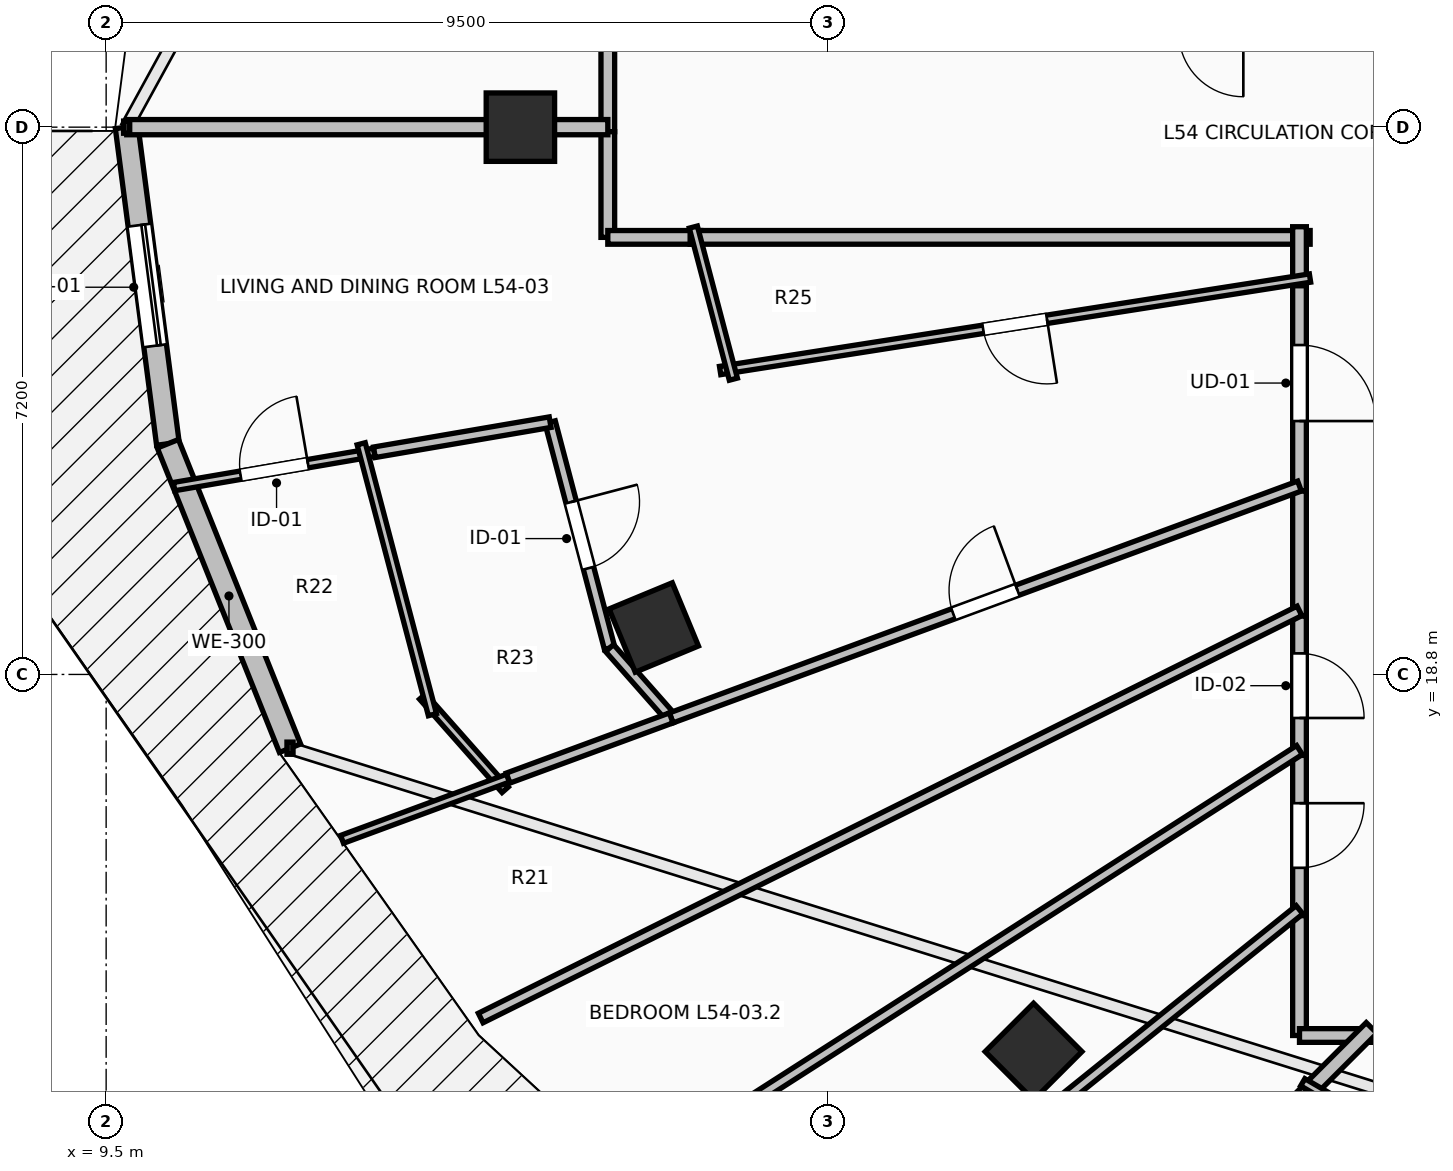
"""IFC4 building model, lengths in metres.
Left out: names, types, materials, properties, quantities, classifications, styles, units other than length and angle.
Written with IfcOpenShell. Run it as: python <this file> out.ifc"""

import sys

from ifc_helpers import new_model, si_unit, direction, frame, frame_2d, origin, origin_2d, place, context, subcontext, project, spatial, rectangle, extrude, element, fill, save


model = new_model("IFC4")
c1 = context("Model", 3, precision=1e-05, world=origin(), true_north=direction((0.0, 1.0)))
c2 = subcontext(c1, "Body", "Model", "MODEL_VIEW")
j1 = project(units=[si_unit("LENGTHUNIT", "METRE"), si_unit("PLANEANGLEUNIT", "RADIAN")], contexts=[c1])
p1 = place(None, origin())
s1 = spatial("IfcSite", under=j1, at=p1, CompositionType="ELEMENT")
p2 = place(p1, origin())
s2 = spatial("IfcBuilding", under=s1, at=p2, CompositionType="ELEMENT")
p3 = place(p2, frame((0.0, 0.0, 200.1)))
s3 = spatial("IfcBuildingStorey", under=s2, at=p3, CompositionType="ELEMENT", Elevation=200.1)
for number, where, z_axis, x_axis in (
    (1, (14.95, 26.0, 0.0), (0.0, 0.0, 1.0), (-1.0, 0.0, 0.0)),
    (2, (16.705, 19.418, 0.0), (0.0, 0.0, 1.0), (-0.924, -0.383, 0.0)),
    (3, (21.701, 13.838, 0.0), (0.0, 0.0, 1.0), (-0.707, -0.707, 0.0)),
):
    element("IfcColumn", number, at=place(p3, frame(where, z_axis=z_axis, x_axis=x_axis)), inside=s3, PredefinedType="COLUMN", context=c2, shape_type="SweptSolid", body=[
        extrude(rectangle(XDim=0.9, YDim=0.9, at=origin_2d()), origin(), (0.0, 0.0, 1.0), 3.55),
    ])
p4 = place(p3, frame((9.77, 26.0, 0.0), z_axis=(0.0, 0.0, 1.0), x_axis=(0.129147853268, -0.991625348605, 0.0)))
e4 = element("IfcWall", 4, at=p4, inside=s3, PredefinedType="STANDARD", context=c2, shape_type="SweptSolid", body=[
    extrude(rectangle(XDim=4.2, YDim=0.3, at=frame_2d((2.1, 0.0))), origin(), (0.0, 0.0, 1.0), 3.29),
])
p5 = place(p4, frame((1.3, 0.0, 0.0)))
e5 = element("IfcOpeningElement", 5, at=p5, cuts=e4, PredefinedType="OPENING", context=c2, shape_type="SweptSolid", body=[
    extrude(rectangle(XDim=1.6, YDim=2.3, at=frame_2d((0.8, 1.15))), frame((0.0, 0.165, 0.0), z_axis=(0.0, -1.0, 0.0), x_axis=(1.0, 0.0, 0.0)), (0.0, 0.0, 1.0), 0.33),
])
p6 = place(p3, frame((10.312, 21.835, 0.0), z_axis=(0.0, 0.0, 1.0), x_axis=(0.372268409848, -0.928125116043, 0.0)))
e6 = element("IfcWall", 6, at=p6, inside=s3, PredefinedType="STANDARD", context=c2, shape_type="SweptSolid", body=[
    extrude(rectangle(XDim=4.315, YDim=0.3, at=frame_2d((2.158, 0.0))), origin(), (0.0, 0.0, 1.0), 3.29),
])
p7 = place(p3, frame((16.1, 27.25, 0.0), z_axis=(0.0, 0.0, 1.0), x_axis=(0.0, -1.0, 0.0)))
e7 = element("IfcWall", 7, at=p7, inside=s3, PredefinedType="PARTITIONING", context=c2, shape_type="SweptSolid", body=[
    extrude(rectangle(XDim=1.31, YDim=0.18, at=frame_2d((0.655, 0.0))), origin(), (0.0, 0.0, 1.0), 2.482),
])
p8 = place(p3, frame((16.1, 25.94, 0.0), z_axis=(0.0, 0.0, 1.0), x_axis=(0.0, -1.0, 0.0)))
e8 = element("IfcWall", 8, at=p8, inside=s3, PredefinedType="PARTITIONING", context=c2, shape_type="SweptSolid", body=[
    extrude(rectangle(XDim=1.39, YDim=0.18, at=frame_2d((0.695, 0.0))), origin(), (0.0, 0.0, 1.0), 2.482),
])
p9 = place(p3, frame((16.1, 24.55, 0.0), z_axis=(0.0, 0.0, 1.0), x_axis=(1.0, 0.0, 0.0)))
e9 = element("IfcWall", 9, at=p9, inside=s3, PredefinedType="PARTITIONING", context=c2, shape_type="SweptSolid", body=[
    extrude(rectangle(XDim=1.223, YDim=0.18, at=frame_2d((0.611, 0.0))), origin(), (0.0, 0.0, 1.0), 3.29),
])
p10 = place(p3, frame((25.2, 24.053, 0.0), z_axis=(0.0, 0.0, 1.0), x_axis=(0.0, -1.0, 0.0)))
e10 = element("IfcWall", 10, at=p10, inside=s3, PredefinedType="PARTITIONING", context=c2, shape_type="SweptSolid", body=[
    extrude(rectangle(XDim=2.839, YDim=0.18, at=frame_2d((1.419, 0.0))), origin(), (0.0, 0.0, 1.0), 3.29),
])
p11 = place(p10, frame((0.919, 0.0, 0.0)))
e11 = element("IfcOpeningElement", 11, at=p11, cuts=e10, PredefinedType="OPENING", context=c2, shape_type="SweptSolid", body=[
    extrude(rectangle(XDim=1.0, YDim=2.15, at=frame_2d((0.5, 1.075))), frame((0.0, 0.105, 0.0), z_axis=(0.0, -1.0, 0.0), x_axis=(1.0, 0.0, 0.0)), (0.0, 0.0, 1.0), 0.21),
])
p12 = place(p3, frame((17.183, 24.55, 0.0), z_axis=(0.0, 0.0, 1.0), x_axis=(1.0, 0.0, 0.0)))
e12 = element("IfcWall", 12, at=p12, inside=s3, PredefinedType="PARTITIONING", context=c2, shape_type="SweptSolid", body=[
    extrude(rectangle(XDim=8.157, YDim=0.18, at=frame_2d((4.079, 0.0))), origin(), (0.0, 0.0, 1.0), 2.936),
])
p13 = place(p3, frame((25.2, 24.69, 0.0), z_axis=(0.0, 0.0, 1.0), x_axis=(0.0, -1.0, 0.0)))
e13 = element("IfcWall", 13, at=p13, inside=s3, PredefinedType="PARTITIONING", context=c2, shape_type="SweptSolid", body=[
    extrude(rectangle(XDim=0.777, YDim=0.18, at=frame_2d((0.388, 0.0))), origin(), (0.0, 0.0, 1.0), 3.29),
])
p14 = place(p3, frame((25.2, 21.214, 0.0), z_axis=(0.0, 0.0, 1.0), x_axis=(0.0, -1.0, 0.0)))
e14 = element("IfcWall", 14, at=p14, inside=s3, PredefinedType="PARTITIONING", context=c2, shape_type="SweptSolid", body=[
    extrude(rectangle(XDim=1.645, YDim=0.18, at=frame_2d((0.823, 0.0))), origin(), (0.0, 0.0, 1.0), 3.29),
])
p15 = place(p3, frame((25.2, 19.569, 0.0), z_axis=(0.0, 0.0, 1.0), x_axis=(0.0, -1.0, 0.0)))
e15 = element("IfcWall", 15, at=p15, inside=s3, PredefinedType="PARTITIONING", context=c2, shape_type="SweptSolid", body=[
    extrude(rectangle(XDim=1.834, YDim=0.18, at=frame_2d((0.917, 0.0))), origin(), (0.0, 0.0, 1.0), 3.29),
])
p16 = place(p15, frame((0.492, 0.0, 0.0)))
e16 = element("IfcOpeningElement", 16, at=p16, cuts=e15, PredefinedType="OPENING", context=c2, shape_type="SweptSolid", body=[
    extrude(rectangle(XDim=0.85, YDim=2.1, at=frame_2d((0.425, 1.05))), frame((0.0, 0.105, 0.0), z_axis=(0.0, -1.0, 0.0), x_axis=(1.0, 0.0, 0.0)), (0.0, 0.0, 1.0), 0.21),
])
p17 = place(p3, frame((25.2, 17.735, 0.0), z_axis=(0.0, 0.0, 1.0), x_axis=(0.0, -1.0, 0.0)))
e17 = element("IfcWall", 17, at=p17, inside=s3, PredefinedType="PARTITIONING", context=c2, shape_type="SweptSolid", body=[
    extrude(rectangle(XDim=2.108, YDim=0.18, at=frame_2d((1.054, 0.0))), origin(), (0.0, 0.0, 1.0), 2.482),
])
p18 = place(p17, frame((0.629, 0.0, 0.0)))
e18 = element("IfcOpeningElement", 18, at=p18, cuts=e17, PredefinedType="OPENING", context=c2, shape_type="SweptSolid", body=[
    extrude(rectangle(XDim=0.85, YDim=2.1, at=frame_2d((0.425, 1.05))), frame((0.0, 0.105, 0.0), z_axis=(0.0, -1.0, 0.0), x_axis=(1.0, 0.0, 0.0)), (0.0, 0.0, 1.0), 0.21),
])
p19 = place(p3, frame((25.2, 15.627, 0.0), z_axis=(0.0, 0.0, 1.0), x_axis=(0.0, -1.0, 0.0)))
e19 = element("IfcWall", 19, at=p19, inside=s3, PredefinedType="PARTITIONING", context=c2, shape_type="SweptSolid", body=[
    extrude(rectangle(XDim=1.577, YDim=0.18, at=frame_2d((0.789, 0.0))), origin(), (0.0, 0.0, 1.0), 2.482),
])
p20 = place(p3, frame((25.2, 14.05, 0.0), z_axis=(0.0, 0.0, 1.0), x_axis=(1.0, 0.0, 0.0)))
e20 = element("IfcWall", 20, at=p20, inside=s3, PredefinedType="PARTITIONING", context=c2, shape_type="SweptSolid", body=[
    extrude(rectangle(XDim=0.91, YDim=0.18, at=frame_2d((0.455, 0.0))), origin(), (0.0, 0.0, 1.0), 3.022),
])
p21 = place(p3, frame((25.97, 14.05, 0.0), z_axis=(0.0, 0.0, 1.0), x_axis=(1.0, 0.0, 0.0)))
e21 = element("IfcWall", 21, at=p21, inside=s3, PredefinedType="PARTITIONING", context=c2, shape_type="SweptSolid", body=[
    extrude(rectangle(XDim=3.385, YDim=0.18, at=frame_2d((1.692, 0.0))), origin(), (0.0, 0.0, 1.0), 2.482),
])
p22 = place(p3, frame((9.771, 26.0, 0.0), z_axis=(0.0, 0.0, 1.0), x_axis=(1.0, 0.0, 0.0)))
e22 = element("IfcWall", 22, at=p22, inside=s3, PredefinedType="PARTITIONING", context=c2, shape_type="SweptSolid", body=[
    extrude(rectangle(XDim=6.329, YDim=0.2, at=frame_2d((3.165, 0.0))), origin(), (0.0, 0.0, 1.0), 2.482),
])
p23 = place(p3, frame((25.338, 24.015, 0.0), z_axis=(0.0, 0.0, 1.0), x_axis=(-0.987940229144, -0.154835731144, 0.0)))
e23 = element("IfcWall", 23, at=p23, inside=s3, PredefinedType="PARTITIONING", context=c2, shape_type="SweptSolid", body=[
    extrude(rectangle(XDim=7.855, YDim=0.11, at=frame_2d((3.928, 0.0))), origin(), (0.0, 0.0, 1.0), 2.936),
])
p24 = place(p23, frame((3.503, 0.0, 0.0)))
e24 = element("IfcOpeningElement", 24, at=p24, cuts=e23, PredefinedType="OPENING", context=c2, shape_type="SweptSolid", body=[
    extrude(rectangle(XDim=0.85, YDim=2.1, at=frame_2d((0.425, 1.05))), frame((0.0, 0.07, 0.0), z_axis=(0.0, -1.0, 0.0), x_axis=(1.0, 0.0, 0.0)), (0.0, 0.0, 1.0), 0.14),
])
p25 = place(p3, frame((17.752, 22.685, 0.0), z_axis=(0.0, 0.0, 1.0), x_axis=(-0.254429402158, 0.967091350038, 0.0)))
e25 = element("IfcWall", 25, at=p25, inside=s3, PredefinedType="PARTITIONING", context=c2, shape_type="SweptSolid", body=[
    extrude(rectangle(XDim=2.069, YDim=0.11, at=frame_2d((1.034, 0.0))), origin(), (0.0, 0.0, 1.0), 3.29),
])
p26 = place(p3, frame((10.394, 21.271, 0.0), z_axis=(0.0, 0.0, 1.0), x_axis=(0.985656128296, 0.168766100722, 0.0)))
e26 = element("IfcWall", 26, at=p26, inside=s3, PredefinedType="PARTITIONING", context=c2, shape_type="SweptSolid", body=[
    extrude(rectangle(XDim=2.673, YDim=0.11, at=frame_2d((1.337, 0.0))), origin(), (0.0, 0.0, 1.0), 3.29),
])
p27 = place(p26, frame((0.887, 0.0, 0.0)))
e27 = element("IfcOpeningElement", 27, at=p27, cuts=e26, PredefinedType="OPENING", context=c2, shape_type="SweptSolid", body=[
    extrude(rectangle(XDim=0.9, YDim=2.1, at=frame_2d((0.45, 1.05))), frame((0.0, 0.07, 0.0), z_axis=(0.0, -1.0, 0.0), x_axis=(1.0, 0.0, 0.0)), (0.0, 0.0, 1.0), 0.14),
])
p28 = place(p3, frame((15.341, 22.119, 0.0), z_axis=(0.0, 0.0, 1.0), x_axis=(0.254462015144, -0.967082769389, 0.0)))
e28 = element("IfcWall", 28, at=p28, inside=s3, PredefinedType="PARTITIONING", context=c2, shape_type="SweptSolid", body=[
    extrude(rectangle(XDim=3.073, YDim=0.14, at=frame_2d((1.537, 0.0))), origin(), (0.0, 0.0, 1.0), 3.29),
])
p29 = place(p28, frame((1.087, 0.0, 0.0)))
e29 = element("IfcOpeningElement", 29, at=p29, cuts=e28, PredefinedType="OPENING", context=c2, shape_type="SweptSolid", body=[
    extrude(rectangle(XDim=0.9, YDim=2.1, at=frame_2d((0.45, 1.05))), frame((0.0, 0.085, 0.0), z_axis=(0.0, -1.0, 0.0), x_axis=(1.0, 0.0, 0.0)), (0.0, 0.0, 1.0), 0.17),
])
p30 = place(p3, frame((16.123, 19.147, 0.0), z_axis=(0.0, 0.0, 1.0), x_axis=(0.66171386468, -0.749756467988, 0.0)))
e30 = element("IfcWall", 30, at=p30, inside=s3, PredefinedType="PARTITIONING", context=c2, shape_type="SweptSolid", body=[
    extrude(rectangle(XDim=1.226, YDim=0.14, at=frame_2d((0.613, 0.0))), origin(), (0.0, 0.0, 1.0), 3.29),
])
p31 = place(p3, frame((13.029, 21.723, 0.0), z_axis=(0.0, 0.0, 1.0), x_axis=(0.985629682191, 0.16892048302, 0.0)))
e31 = element("IfcWall", 31, at=p31, inside=s3, PredefinedType="PARTITIONING", context=c2, shape_type="SweptSolid", body=[
    extrude(rectangle(XDim=2.346, YDim=0.14, at=frame_2d((1.173, 0.0))), origin(), (0.0, 0.0, 1.0), 3.29),
])
p32 = place(p3, frame((16.934, 18.228, 0.0), z_axis=(0.0, 0.0, 1.0), x_axis=(0.938168899516, 0.34617786755, 0.0)))
e32 = element("IfcWall", 32, at=p32, inside=s3, PredefinedType="PARTITIONING", context=c2, shape_type="SweptSolid", body=[
    extrude(rectangle(XDim=8.811, YDim=0.14, at=frame_2d((4.405, 0.0))), origin(), (0.0, 0.0, 1.0), 2.482),
])
p33 = place(p32, frame((3.955, 0.0, 0.0)))
e33 = element("IfcOpeningElement", 33, at=p33, cuts=e32, PredefinedType="OPENING", context=c2, shape_type="SweptSolid", body=[
    extrude(rectangle(XDim=0.9, YDim=2.1, at=frame_2d((0.45, 1.05))), frame((0.0, 0.085, 0.0), z_axis=(0.0, -1.0, 0.0), x_axis=(1.0, 0.0, 0.0)), (0.0, 0.0, 1.0), 0.17),
])
p34 = place(p3, frame((14.75, 17.283, 0.0), z_axis=(0.0, 0.0, 1.0), x_axis=(-0.662345628205, 0.749198417509, 0.0)))
e34 = element("IfcWall", 34, at=p34, inside=s3, PredefinedType="PARTITIONING", context=c2, shape_type="SweptSolid", body=[
    extrude(rectangle(XDim=1.639, YDim=0.11, at=frame_2d((0.819, 0.0))), origin(), (0.0, 0.0, 1.0), 3.29),
])
p35 = place(p3, frame((13.792, 18.271, 0.0), z_axis=(0.0, 0.0, 1.0), x_axis=(-0.254271540361, 0.967132867688, 0.0)))
e35 = element("IfcWall", 35, at=p35, inside=s3, PredefinedType="PARTITIONING", context=c2, shape_type="SweptSolid", body=[
    extrude(rectangle(XDim=3.685, YDim=0.11, at=frame_2d((1.843, 0.0))), origin(), (0.0, 0.0, 1.0), 3.29),
])
p36 = place(p3, frame((12.604, 16.631, 0.0), z_axis=(0.0, 0.0, 1.0), x_axis=(0.938194450562, 0.346108614361, 0.0)))
e36 = element("IfcWall", 36, at=p36, inside=s3, PredefinedType="PARTITIONING", context=c2, shape_type="SweptSolid", body=[
    extrude(rectangle(XDim=2.328, YDim=0.11, at=frame_2d((1.164, 0.0))), origin(), (0.0, 0.0, 1.0), 3.29),
])
p37 = place(p3, frame((14.788, 17.436, 0.0), z_axis=(0.0, 0.0, 1.0), x_axis=(0.938171690747, 0.346170303003, 0.0)))
e37 = element("IfcWall", 37, at=p37, inside=s3, PredefinedType="PARTITIONING", context=c2, shape_type="SweptSolid", body=[
    extrude(rectangle(XDim=2.287, YDim=0.14, at=frame_2d((1.144, 0.0))), origin(), (0.0, 0.0, 1.0), 3.29),
])
p38 = place(p3, frame((14.428, 14.28, 0.0), z_axis=(0.0, 0.0, 1.0), x_axis=(0.895423439435, 0.44521552546, 0.0)))
e38 = element("IfcWall", 38, at=p38, inside=s3, PredefinedType="PARTITIONING", context=c2, shape_type="SweptSolid", body=[
    extrude(rectangle(XDim=12.03, YDim=0.14, at=frame_2d((6.015, 0.0))), origin(), (0.0, 0.0, 1.0), 2.482),
])
p39 = place(p3, frame((16.555, 12.272, 0.0), z_axis=(0.0, 0.0, 1.0), x_axis=(0.842221721565, 0.539131312135, 0.0)))
e39 = element("IfcWall", 39, at=p39, inside=s3, PredefinedType="PARTITIONING", context=c2, shape_type="SweptSolid", body=[
    extrude(rectangle(XDim=10.265, YDim=0.14, at=frame_2d((5.132, 0.0))), origin(), (0.0, 0.0, 1.0), 2.482),
])
p40 = place(p3, frame((18.715, 10.487, 0.0), z_axis=(0.0, 0.0, 1.0), x_axis=(0.779157389419, 0.626828335762, 0.0)))
e40 = element("IfcWall", 40, at=p40, inside=s3, PredefinedType="PARTITIONING", context=c2, shape_type="SweptSolid", body=[
    extrude(rectangle(XDim=8.323, YDim=0.14, at=frame_2d((4.162, 0.0))), origin(), (0.0, 0.0, 1.0), 2.482),
])
p41 = place(p40, frame((2.896, 0.0, 0.0)))
e41 = element("IfcOpeningElement", 41, at=p41, cuts=e40, PredefinedType="OPENING", context=c2, shape_type="SweptSolid", body=[
    extrude(rectangle(XDim=0.85, YDim=2.1, at=frame_2d((0.425, 1.05))), frame((0.0, 0.085, 0.0), z_axis=(0.0, -1.0, 0.0), x_axis=(1.0, 0.0, 0.0)), (0.0, 0.0, 1.0), 0.17),
])
p42 = place(p3, frame((21.041, 9.041, 0.0), z_axis=(0.0, 0.0, 1.0), x_axis=(0.707106781187, 0.707106781187, 0.0)))
e42 = element("IfcWall", 42, at=p42, inside=s3, PredefinedType="PARTITIONING", context=c2, shape_type="SweptSolid", body=[
    extrude(rectangle(XDim=6.176, YDim=0.2, at=frame_2d((3.088, 0.0))), origin(), (0.0, 0.0, 1.0), 2.824),
])
p43 = place(p3, frame((25.309, 13.309, 0.0), z_axis=(0.0, 0.0, 1.0), x_axis=(0.707106781187, 0.707106781187, 0.0)))
e43 = element("IfcWall", 43, at=p43, inside=s3, PredefinedType="PARTITIONING", context=c2, shape_type="SweptSolid", body=[
    extrude(rectangle(XDim=1.188, YDim=0.2, at=frame_2d((0.594, 0.0))), origin(), (0.0, 0.0, 1.0), 3.022),
])
p44 = place(p3, frame((27.568, 12.083, 0.0), z_axis=(0.0, 0.0, 1.0), x_axis=(-0.864515441931, 0.502606258082, 0.0)))
e44 = element("IfcWall", 44, at=p44, inside=s3, PredefinedType="PARTITIONING", context=c2, shape_type="SweptSolid", body=[
    extrude(rectangle(XDim=2.69, YDim=0.11, at=frame_2d((1.345, 0.0))), origin(), (0.0, 0.0, 1.0), 3.29),
])
p45 = place(p5, origin())
e45 = element("IfcDoor", 45, at=p45, inside=s3, OperationType="SLIDING_TO_LEFT", PredefinedType="DOOR", context=c2, shape_type="SweptSolid", body=[
    extrude(rectangle(XDim=1.6, YDim=2.3, at=frame_2d((0.8, 1.15))), frame((0.0, 0.025, 0.0), z_axis=(0.0, -1.0, 0.0), x_axis=(1.0, 0.0, 0.0)), (0.0, 0.0, 1.0), 0.05),
])
fill(e5, e45)
p46 = place(p11, origin())
e46 = element("IfcDoor", 46, at=p46, inside=s3, OperationType="SINGLE_SWING_RIGHT", PredefinedType="DOOR", context=c2, shape_type="SweptSolid", body=[
    extrude(rectangle(XDim=1.0, YDim=2.15, at=frame_2d((0.5, 1.075))), frame((0.0, 0.025, 0.0), z_axis=(0.0, -1.0, 0.0), x_axis=(1.0, 0.0, 0.0)), (0.0, 0.0, 1.0), 0.05),
])
fill(e11, e46)
p47 = place(p24, origin())
e47 = element("IfcDoor", 47, at=p47, inside=s3, OperationType="SINGLE_SWING_LEFT", PredefinedType="DOOR", context=c2, shape_type="SweptSolid", body=[
    extrude(rectangle(XDim=0.85, YDim=2.1, at=frame_2d((0.425, 1.05))), frame((0.0, 0.025, 0.0), z_axis=(0.0, -1.0, 0.0), x_axis=(1.0, 0.0, 0.0)), (0.0, 0.0, 1.0), 0.05),
])
fill(e24, e47)
p48 = place(p27, origin())
e48 = element("IfcDoor", 48, at=p48, inside=s3, OperationType="SINGLE_SWING_RIGHT", PredefinedType="DOOR", context=c2, shape_type="SweptSolid", body=[
    extrude(rectangle(XDim=0.9, YDim=2.1, at=frame_2d((0.45, 1.05))), frame((0.0, 0.025, 0.0), z_axis=(0.0, -1.0, 0.0), x_axis=(1.0, 0.0, 0.0)), (0.0, 0.0, 1.0), 0.05),
])
fill(e27, e48)
p49 = place(p29, origin())
e49 = element("IfcDoor", 49, at=p49, inside=s3, OperationType="SINGLE_SWING_LEFT", PredefinedType="DOOR", context=c2, shape_type="SweptSolid", body=[
    extrude(rectangle(XDim=0.9, YDim=2.1, at=frame_2d((0.45, 1.05))), frame((0.0, 0.025, 0.0), z_axis=(0.0, -1.0, 0.0), x_axis=(1.0, 0.0, 0.0)), (0.0, 0.0, 1.0), 0.05),
])
fill(e29, e49)
p50 = place(p33, origin())
e50 = element("IfcDoor", 50, at=p50, inside=s3, OperationType="SINGLE_SWING_RIGHT", PredefinedType="DOOR", context=c2, shape_type="SweptSolid", body=[
    extrude(rectangle(XDim=0.9, YDim=2.1, at=frame_2d((0.45, 1.05))), frame((0.0, 0.025, 0.0), z_axis=(0.0, -1.0, 0.0), x_axis=(1.0, 0.0, 0.0)), (0.0, 0.0, 1.0), 0.05),
])
fill(e33, e50)
p51 = place(p16, origin())
e51 = element("IfcDoor", 51, at=p51, inside=s3, OperationType="SINGLE_SWING_RIGHT", PredefinedType="DOOR", context=c2, shape_type="SweptSolid", body=[
    extrude(rectangle(XDim=0.85, YDim=2.1, at=frame_2d((0.425, 1.05))), frame((0.0, 0.025, 0.0), z_axis=(0.0, -1.0, 0.0), x_axis=(1.0, 0.0, 0.0)), (0.0, 0.0, 1.0), 0.05),
])
fill(e16, e51)
p52 = place(p18, origin())
e52 = element("IfcDoor", 52, at=p52, inside=s3, OperationType="SINGLE_SWING_LEFT", PredefinedType="DOOR", context=c2, shape_type="SweptSolid", body=[
    extrude(rectangle(XDim=0.85, YDim=2.1, at=frame_2d((0.425, 1.05))), frame((0.0, 0.025, 0.0), z_axis=(0.0, -1.0, 0.0), x_axis=(1.0, 0.0, 0.0)), (0.0, 0.0, 1.0), 0.05),
])
fill(e18, e52)
save(model, sys.argv[1])
